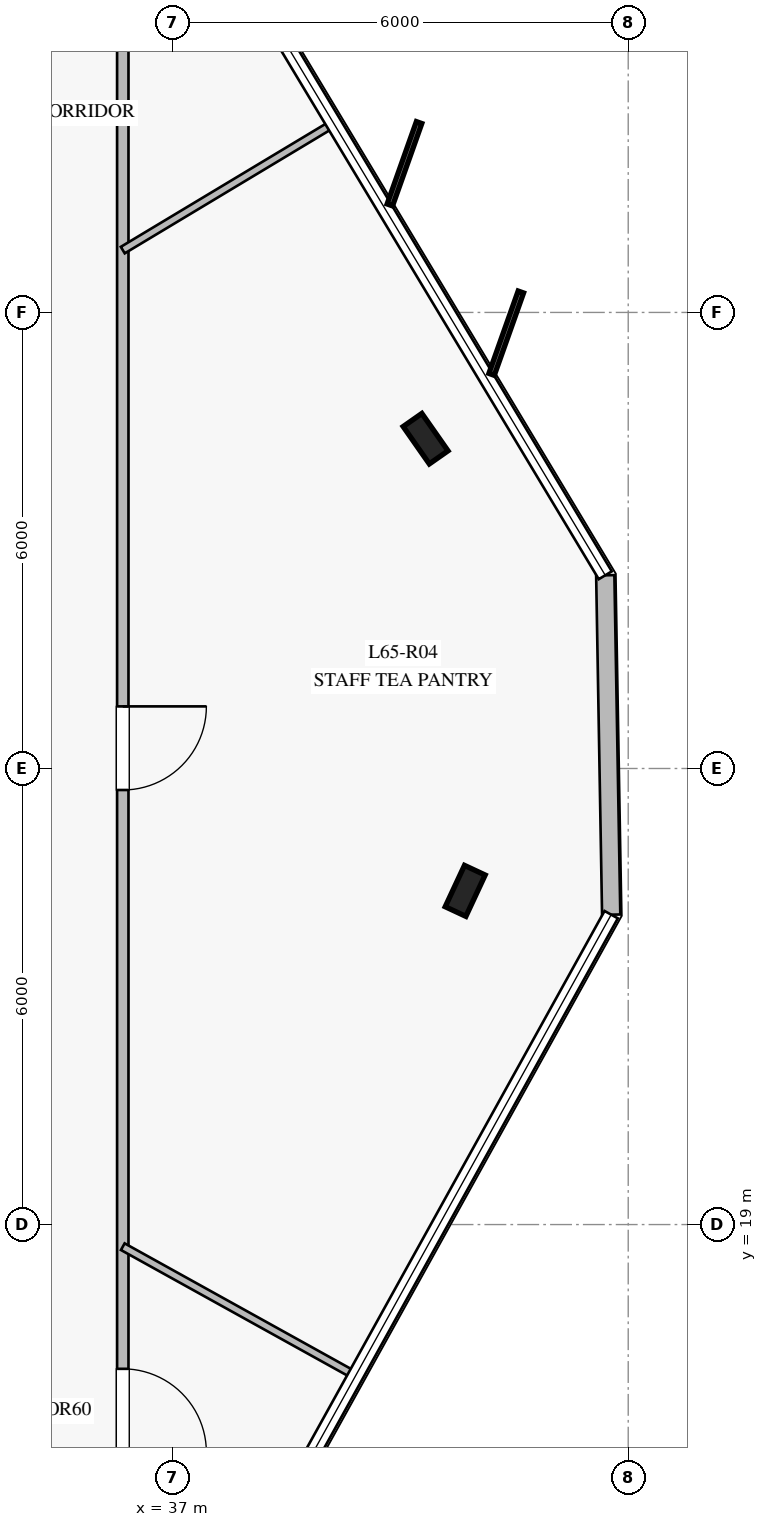
"""IFC4 building model, lengths in metres.
Left out: names, types, materials, properties, quantities, classifications, styles, units other than length and angle.
Written with IfcOpenShell. Run it as: python <this file> out.ifc"""

import sys

from ifc_helpers import new_model, si_unit, direction, frame, frame_2d, origin, origin_2d, place, context, subcontext, project, spatial, rectangle, i_section, extrude, element, fill, save


model = new_model("IFC4")
c1 = context("Model", 3, precision=1e-05, world=origin(), true_north=direction((0.0, 1.0)))
c2 = subcontext(c1, "Body", "Model", "MODEL_VIEW")
j1 = project(units=[si_unit("LENGTHUNIT", "METRE"), si_unit("PLANEANGLEUNIT", "RADIAN")], contexts=[c1])
p1 = place(None, origin())
s1 = spatial("IfcSite", under=j1, at=p1, CompositionType="ELEMENT")
p2 = place(p1, origin())
s2 = spatial("IfcBuilding", under=s1, at=p2, CompositionType="ELEMENT")
p3 = place(p2, frame((0.0, 0.0, 270.2)))
s3 = spatial("IfcBuildingStorey", under=s2, at=p3, CompositionType="ELEMENT", Elevation=270.2)
for number, where, z_axis, x_axis in (
    (1, (40.855, 23.39, 0.0), (0.0, 0.0, 1.0), (0.423, 0.906, 0.0)),
    (2, (40.334, 29.339, 0.0), (0.0, 0.0, 1.0), (-0.574, 0.819, 0.0)),
):
    element("IfcColumn", number, at=place(p3, frame(where, z_axis=z_axis, x_axis=x_axis)), inside=s3, PredefinedType="COLUMN", context=c2, shape_type="SweptSolid", body=[
        extrude(i_section(OverallWidth=0.3, OverallDepth=0.6, WebThickness=0.015, FlangeThickness=0.03, at=origin_2d()), origin(), (0.0, 0.0, 1.0), 4.0),
    ])
p4 = place(p3, frame((42.776, 23.077, 0.0), z_axis=(0.0, 0.0, 1.0), x_axis=(-0.01743952575, 0.999847919907, 0.0)))
e3 = element("IfcWall", 3, at=p4, inside=s3, PredefinedType="STANDARD", context=c2, shape_type="SweptSolid", body=[
    extrude(rectangle(XDim=4.466, YDim=0.24, at=frame_2d((2.233, 0.0))), origin(), (0.0, 0.0, 1.0), 3.78),
])
p5 = place(p3, frame((36.35, 35.75, 0.0), z_axis=(0.0, 0.0, 1.0), x_axis=(0.0, -1.0, 0.0)))
e4 = element("IfcWall", 4, at=p5, inside=s3, PredefinedType="PARTITIONING", context=c2, shape_type="SweptSolid", body=[
    extrude(rectangle(XDim=21.5, YDim=0.15, at=frame_2d((10.75, 0.0))), origin(), (0.0, 0.0, 1.0), 3.25),
])
p6 = place(p5, frame((18.648, 0.0, 0.0)))
e5 = element("IfcOpeningElement", 5, at=p6, cuts=e4, PredefinedType="OPENING", context=c2, shape_type="SweptSolid", body=[
    extrude(rectangle(XDim=1.1, YDim=2.2, at=frame_2d((0.55, 1.1))), frame((0.0, 0.085, 0.0), z_axis=(0.0, -1.0, 0.0), x_axis=(1.0, 0.0, 0.0)), (0.0, 0.0, 1.0), 0.17),
])
p7 = place(p5, frame((9.933, 0.0, 0.0)))
e6 = element("IfcOpeningElement", 6, at=p7, cuts=e4, PredefinedType="OPENING", context=c2, shape_type="SweptSolid", body=[
    extrude(rectangle(XDim=1.1, YDim=2.2, at=frame_2d((0.55, 1.1))), frame((0.0, 0.085, 0.0), z_axis=(0.0, -1.0, 0.0), x_axis=(1.0, 0.0, 0.0)), (0.0, 0.0, 1.0), 0.17),
])
p8 = place(p3, frame((36.35, 18.709, 0.0), z_axis=(0.0, 0.0, 1.0), x_axis=(0.874507187931, -0.485012554741, 0.0)))
e7 = element("IfcWall", 7, at=p8, inside=s3, PredefinedType="MOVABLE", context=c2, shape_type="SweptSolid", body=[
    extrude(rectangle(XDim=3.486, YDim=0.1, at=frame_2d((1.743, 0.0))), origin(), (0.0, 0.0, 1.0), 3.28),
])
p9 = place(p3, frame((36.35, 31.82, 0.0), z_axis=(0.0, 0.0, 1.0), x_axis=(0.85725213213, 0.514896865361, 0.0)))
e8 = element("IfcWall", 8, at=p9, inside=s3, PredefinedType="MOVABLE", context=c2, shape_type="SweptSolid", body=[
    extrude(rectangle(XDim=3.222, YDim=0.1, at=frame_2d((1.611, 0.0))), origin(), (0.0, 0.0, 1.0), 3.28),
])
p10 = place(p6, origin())
e9 = element("IfcDoor", 9, at=p10, inside=s3, OperationType="SINGLE_SWING_RIGHT", PredefinedType="DOOR", context=c2, shape_type="SweptSolid", body=[
    extrude(rectangle(XDim=1.1, YDim=2.2, at=frame_2d((0.55, 1.1))), frame((0.0, 0.025, 0.0), z_axis=(0.0, -1.0, 0.0), x_axis=(1.0, 0.0, 0.0)), (0.0, 0.0, 1.0), 0.05),
])
fill(e5, e9)
p11 = place(p7, origin())
e10 = element("IfcDoor", 10, at=p11, inside=s3, OperationType="SINGLE_SWING_LEFT", PredefinedType="DOOR", context=c2, shape_type="SweptSolid", body=[
    extrude(rectangle(XDim=1.1, YDim=2.2, at=frame_2d((0.55, 1.1))), frame((0.0, 0.025, 0.0), z_axis=(0.0, -1.0, 0.0), x_axis=(1.0, 0.0, 0.0)), (0.0, 0.0, 1.0), 0.05),
])
fill(e6, e10)
save(model, sys.argv[1])
